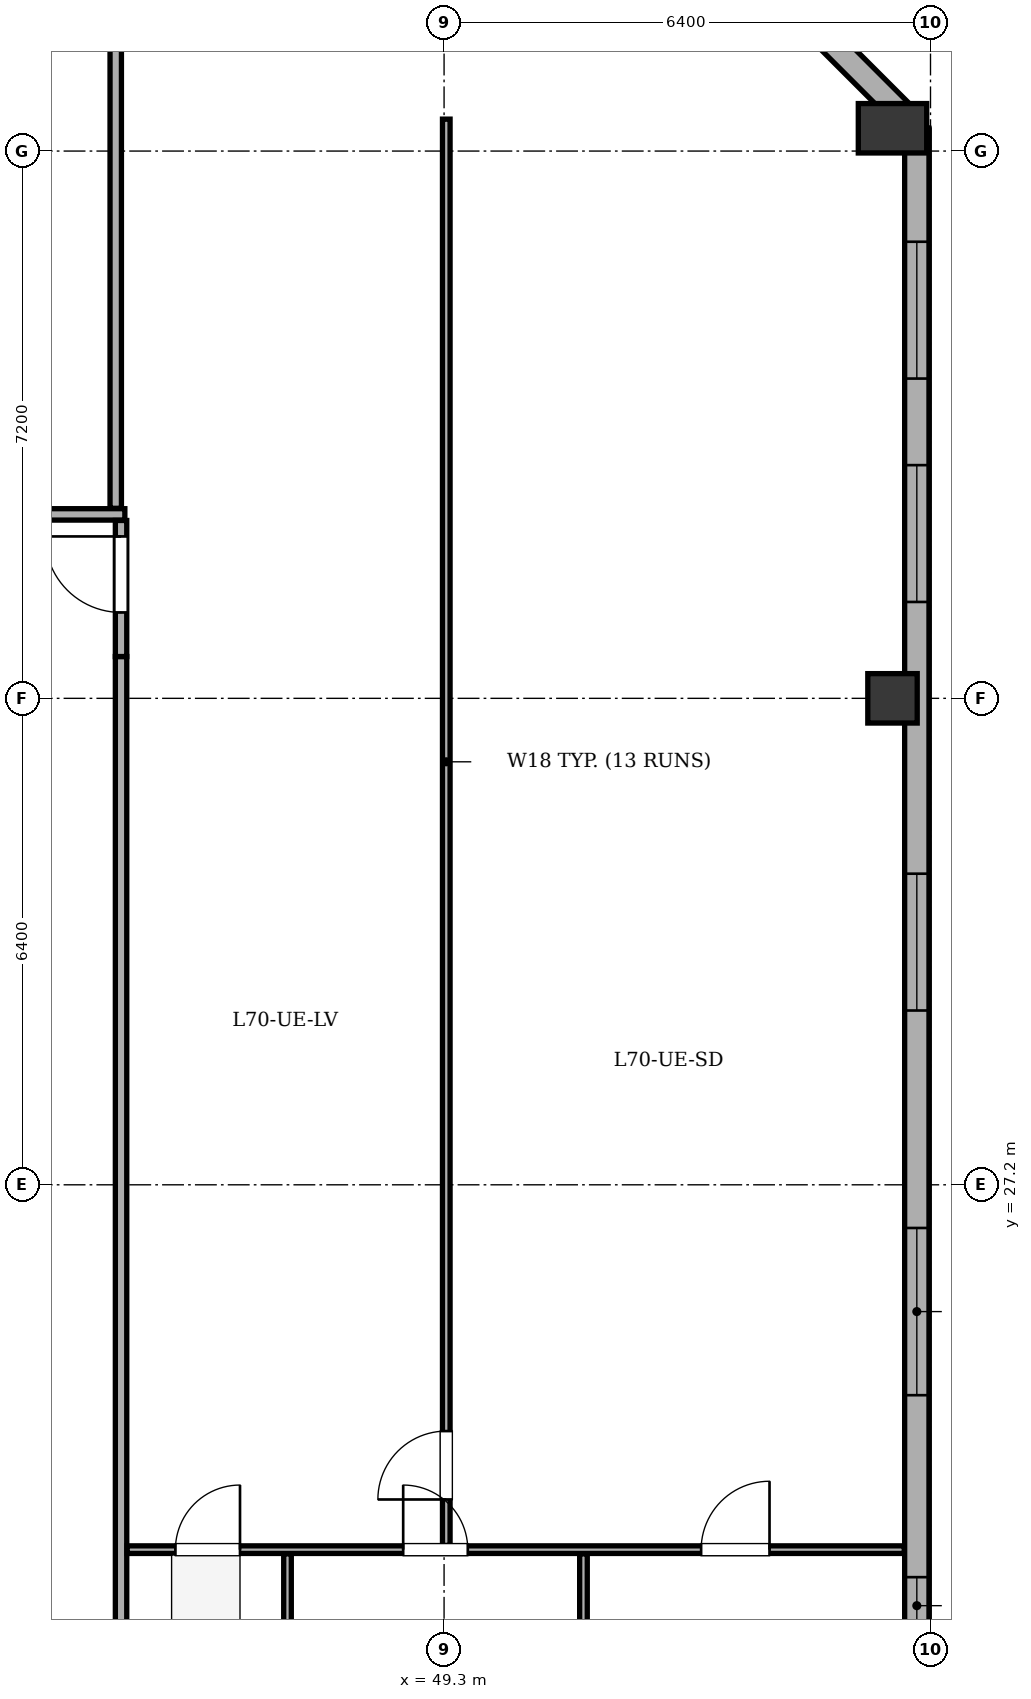
"""IFC4 building model, lengths in metres.
Left out: names, types, materials, properties, quantities, classifications, styles, units other than length and angle.
Written with IfcOpenShell. Run it as: python <this file> out.ifc"""

import sys

from ifc_helpers import new_model, si_unit, direction, frame, frame_2d, origin, origin_2d, place, context, subcontext, project, spatial, rectangle, extrude, element, fill, save


model = new_model("IFC4")
c1 = context("Model", 3, precision=1e-05, world=origin(), true_north=direction((0.0, 1.0)))
c2 = subcontext(c1, "Body", "Model", "MODEL_VIEW")
j1 = project(units=[si_unit("LENGTHUNIT", "METRE"), si_unit("PLANEANGLEUNIT", "RADIAN")], contexts=[c1])
p1 = place(None, origin())
s1 = spatial("IfcSite", under=j1, at=p1, CompositionType="ELEMENT")
p2 = place(p1, origin())
s2 = spatial("IfcBuilding", under=s1, at=p2, CompositionType="ELEMENT")
p3 = place(p2, frame((0.0, 0.0, 265.3)))
s3 = spatial("IfcBuildingStorey", under=s2, at=p3, CompositionType="ELEMENT", Elevation=265.3)
p4 = place(p3, frame((55.2, 33.6, 0.0), z_axis=(0.0, 0.0, 1.0), x_axis=(1.0, 0.0, 0.0)))
e1 = element("IfcColumn", 1, at=p4, inside=s3, PredefinedType="COLUMN", context=c2, shape_type="SweptSolid", body=[
    extrude(rectangle(XDim=0.65, YDim=0.65, at=origin_2d()), origin(), (0.0, 0.0, 1.0), 3.4),
])
p5 = place(p3, frame((55.2, 41.1, 0.0), z_axis=(0.0, 0.0, 1.0), x_axis=(1.0, 0.0, 0.0)))
e2 = element("IfcColumn", 2, at=p5, inside=s3, PredefinedType="COLUMN", context=c2, shape_type="SweptSolid", body=[
    extrude(rectangle(XDim=0.65, YDim=0.9, at=origin_2d()), origin(), (0.0, 0.0, 1.0), 3.4),
])
p6 = place(p3, frame((51.7, 44.92, 0.0), z_axis=(0.0, 0.0, 1.0), x_axis=(0.70712937715, -0.707084184501, 0.0)))
e3 = element("IfcWall", 3, at=p6, inside=s3, PredefinedType="STANDARD", context=c2, shape_type="SweptSolid", body=[
    extrude(rectangle(XDim=5.402, YDim=0.32, at=frame_2d((2.701, 0.0))), origin(), (0.0, 0.0, 1.0), 2.335),
])
p7 = place(p6, frame((2.001, 0.0, 0.75)))
e4 = element("IfcOpeningElement", 4, at=p7, cuts=e3, PredefinedType="OPENING", context=c2, shape_type="SweptSolid", body=[
    extrude(rectangle(XDim=1.4, YDim=1.465, at=frame_2d((0.7, 0.732))), frame((0.0, 0.17, 0.0), z_axis=(0.0, -1.0, 0.0), x_axis=(1.0, 0.0, 0.0)), (0.0, 0.0, 1.0), 0.34),
])
p8 = place(p3, frame((55.52, 41.1, 0.0), z_axis=(0.0, 0.0, 1.0), x_axis=(0.0, -1.0, 0.0)))
e5 = element("IfcWall", 5, at=p8, inside=s3, PredefinedType="STANDARD", context=c2, shape_type="SweptSolid", body=[
    extrude(rectangle(XDim=21.25, YDim=0.32, at=frame_2d((10.625, 0.0))), origin(), (0.0, 0.0, 1.0), 2.335),
])
p9 = place(p8, frame((1.493, 0.0, 0.75)))
e6 = element("IfcOpeningElement", 6, at=p9, cuts=e5, PredefinedType="OPENING", context=c2, shape_type="SweptSolid", body=[
    extrude(rectangle(XDim=1.8, YDim=1.465, at=frame_2d((0.9, 0.732))), frame((0.0, 0.17, 0.0), z_axis=(0.0, -1.0, 0.0), x_axis=(1.0, 0.0, 0.0)), (0.0, 0.0, 1.0), 0.34),
])
p10 = place(p8, frame((4.432, 0.0, 0.75)))
e7 = element("IfcOpeningElement", 7, at=p10, cuts=e5, PredefinedType="OPENING", context=c2, shape_type="SweptSolid", body=[
    extrude(rectangle(XDim=1.8, YDim=1.465, at=frame_2d((0.9, 0.732))), frame((0.0, 0.17, 0.0), z_axis=(0.0, -1.0, 0.0), x_axis=(1.0, 0.0, 0.0)), (0.0, 0.0, 1.0), 0.34),
])
p11 = place(p8, frame((9.807, 0.0, 0.75)))
e8 = element("IfcOpeningElement", 8, at=p11, cuts=e5, PredefinedType="OPENING", context=c2, shape_type="SweptSolid", body=[
    extrude(rectangle(XDim=1.8, YDim=1.465, at=frame_2d((0.9, 0.732))), frame((0.0, 0.17, 0.0), z_axis=(0.0, -1.0, 0.0), x_axis=(1.0, 0.0, 0.0)), (0.0, 0.0, 1.0), 0.34),
])
p12 = place(p8, frame((14.468, 0.0, 0.75)))
e9 = element("IfcOpeningElement", 9, at=p12, cuts=e5, PredefinedType="OPENING", context=c2, shape_type="SweptSolid", body=[
    extrude(rectangle(XDim=2.2, YDim=1.465, at=frame_2d((1.1, 0.732))), frame((0.0, 0.17, 0.0), z_axis=(0.0, -1.0, 0.0), x_axis=(1.0, 0.0, 0.0)), (0.0, 0.0, 1.0), 0.34),
])
p13 = place(p8, frame((19.062, 0.0, 0.75)))
e10 = element("IfcOpeningElement", 10, at=p13, cuts=e5, PredefinedType="OPENING", context=c2, shape_type="SweptSolid", body=[
    extrude(rectangle(XDim=0.75, YDim=1.45, at=frame_2d((0.375, 0.725))), frame((0.0, 0.17, 0.0), z_axis=(0.0, -1.0, 0.0), x_axis=(1.0, 0.0, 0.0)), (0.0, 0.0, 1.0), 0.34),
])
p14 = place(p3, frame((14.58, 36.02, 0.0), z_axis=(0.0, 0.0, 1.0), x_axis=(1.0, 0.0, 0.0)))
e11 = element("IfcWall", 11, at=p14, inside=s3, PredefinedType="PARTITIONING", context=c2, shape_type="SweptSolid", body=[
    extrude(rectangle(XDim=30.52, YDim=0.15, at=frame_2d((15.26, 0.0))), origin(), (0.0, 0.0, 1.0), 2.95),
])
p15 = place(p14, frame((3.253, 0.0, 0.0)))
e12 = element("IfcOpeningElement", 12, at=p15, cuts=e11, PredefinedType="OPENING", context=c2, shape_type="SweptSolid", body=[
    extrude(rectangle(XDim=1.0, YDim=2.1, at=frame_2d((0.5, 1.05))), frame((0.0, 0.085, 0.0), z_axis=(0.0, -1.0, 0.0), x_axis=(1.0, 0.0, 0.0)), (0.0, 0.0, 1.0), 0.17),
])
p16 = place(p14, frame((10.823, 0.0, 0.0)))
e13 = element("IfcOpeningElement", 13, at=p16, cuts=e11, PredefinedType="OPENING", context=c2, shape_type="SweptSolid", body=[
    extrude(rectangle(XDim=1.0, YDim=2.1, at=frame_2d((0.5, 1.05))), frame((0.0, 0.085, 0.0), z_axis=(0.0, -1.0, 0.0), x_axis=(1.0, 0.0, 0.0)), (0.0, 0.0, 1.0), 0.17),
])
p17 = place(p14, frame((18.697, 0.0, 0.0)))
e14 = element("IfcOpeningElement", 14, at=p17, cuts=e11, PredefinedType="OPENING", context=c2, shape_type="SweptSolid", body=[
    extrude(rectangle(XDim=1.0, YDim=2.1, at=frame_2d((0.5, 1.05))), frame((0.0, 0.085, 0.0), z_axis=(0.0, -1.0, 0.0), x_axis=(1.0, 0.0, 0.0)), (0.0, 0.0, 1.0), 0.17),
])
p18 = place(p14, frame((26.267, 0.0, 0.0)))
e15 = element("IfcOpeningElement", 15, at=p18, cuts=e11, PredefinedType="OPENING", context=c2, shape_type="SweptSolid", body=[
    extrude(rectangle(XDim=1.0, YDim=2.1, at=frame_2d((0.5, 1.05))), frame((0.0, 0.085, 0.0), z_axis=(0.0, -1.0, 0.0), x_axis=(1.0, 0.0, 0.0)), (0.0, 0.0, 1.0), 0.17),
])
p19 = place(p3, frame((44.98, 36.1, 0.0), z_axis=(0.0, 0.0, 1.0), x_axis=(0.0, 1.0, 0.0)))
e16 = element("IfcWall", 16, at=p19, inside=s3, PredefinedType="PARTITIONING", context=c2, shape_type="SweptSolid", body=[
    extrude(rectangle(XDim=8.655, YDim=0.15, at=frame_2d((4.327, 0.0))), origin(), (0.0, 0.0, 1.0), 2.95),
])
p20 = place(p3, frame((45.05, 20.25, 0.0), z_axis=(0.0, 0.0, 1.0), x_axis=(0.0, 1.0, 0.0)))
e17 = element("IfcWall", 17, at=p20, inside=s3, PredefinedType="PARTITIONING", context=c2, shape_type="SweptSolid", body=[
    extrude(rectangle(XDim=13.9, YDim=0.15, at=frame_2d((6.95, 0.0))), origin(), (0.0, 0.0, 1.0), 2.135),
])
p21 = place(p3, frame((45.05, 34.15, 0.0), z_axis=(0.0, 0.0, 1.0), x_axis=(0.0, 1.0, 0.0)))
e18 = element("IfcWall", 18, at=p21, inside=s3, PredefinedType="PARTITIONING", context=c2, shape_type="SweptSolid", body=[
    extrude(rectangle(XDim=1.79, YDim=0.15, at=frame_2d((0.895, 0.0))), origin(), (0.0, 0.0, 1.0), 2.135),
])
p22 = place(p21, frame((0.58, 0.0, 0.0)))
e19 = element("IfcOpeningElement", 19, at=p22, cuts=e18, PredefinedType="OPENING", context=c2, shape_type="SweptSolid", body=[
    extrude(rectangle(XDim=1.0, YDim=2.1, at=frame_2d((0.5, 1.05))), frame((0.0, 0.085, 0.0), z_axis=(0.0, -1.0, 0.0), x_axis=(1.0, 0.0, 0.0)), (0.0, 0.0, 1.0), 0.17),
])
p23 = place(p3, frame((45.13, 22.4, 0.0), z_axis=(0.0, 0.0, 1.0), x_axis=(1.0, 0.0, 0.0)))
e20 = element("IfcWall", 20, at=p23, inside=s3, PredefinedType="PARTITIONING", context=c2, shape_type="SweptSolid", body=[
    extrude(rectangle(XDim=10.225, YDim=0.1, at=frame_2d((5.113, 0.0))), origin(), (0.0, 0.0, 1.0), 2.95),
])
p24 = place(p23, frame((0.635, 0.0, 0.0)))
e21 = element("IfcOpeningElement", 21, at=p24, cuts=e20, PredefinedType="OPENING", context=c2, shape_type="SweptSolid", body=[
    extrude(rectangle(XDim=0.85, YDim=2.05, at=frame_2d((0.425, 1.025))), frame((0.0, 0.06, 0.0), z_axis=(0.0, -1.0, 0.0), x_axis=(1.0, 0.0, 0.0)), (0.0, 0.0, 1.0), 0.12),
])
p25 = place(p23, frame((3.632, 0.0, 0.0)))
e22 = element("IfcOpeningElement", 22, at=p25, cuts=e20, PredefinedType="OPENING", context=c2, shape_type="SweptSolid", body=[
    extrude(rectangle(XDim=0.85, YDim=2.05, at=frame_2d((0.425, 1.025))), frame((0.0, 0.06, 0.0), z_axis=(0.0, -1.0, 0.0), x_axis=(1.0, 0.0, 0.0)), (0.0, 0.0, 1.0), 0.12),
])
p26 = place(p23, frame((7.552, 0.0, 0.0)))
e23 = element("IfcOpeningElement", 23, at=p26, cuts=e20, PredefinedType="OPENING", context=c2, shape_type="SweptSolid", body=[
    extrude(rectangle(XDim=0.9, YDim=2.05, at=frame_2d((0.45, 1.025))), frame((0.0, 0.06, 0.0), z_axis=(0.0, -1.0, 0.0), x_axis=(1.0, 0.0, 0.0)), (0.0, 0.0, 1.0), 0.12),
])
p27 = place(p3, frame((49.329, 22.455, 0.0), z_axis=(0.0, 0.0, 1.0), x_axis=(0.0, 1.0, 0.0)))
e24 = element("IfcWall", 24, at=p27, inside=s3, PredefinedType="PARTITIONING", context=c2, shape_type="SweptSolid", body=[
    extrude(rectangle(XDim=18.765, YDim=0.1, at=frame_2d((9.382, 0.0))), origin(), (0.0, 0.0, 1.0), 2.95),
])
p28 = place(p27, frame((0.605, 0.0, 0.0)))
e25 = element("IfcOpeningElement", 25, at=p28, cuts=e24, PredefinedType="OPENING", context=c2, shape_type="SweptSolid", body=[
    extrude(rectangle(XDim=0.9, YDim=2.05, at=frame_2d((0.45, 1.025))), frame((0.0, 0.06, 0.0), z_axis=(0.0, -1.0, 0.0), x_axis=(1.0, 0.0, 0.0)), (0.0, 0.0, 1.0), 0.12),
])
for number, where, z_axis, x_axis in (
    (26, (47.24, 19.73, 0.0), (0.0, 0.0, 1.0), (0.0, 1.0, 0.0)),
    (27, (51.134, 19.73, 0.0), (0.0, 0.0, 1.0), (0.0, 1.0, 0.0)),
):
    element("IfcWall", number, at=place(p3, frame(where, z_axis=z_axis, x_axis=x_axis)), inside=s3, PredefinedType="PARTITIONING", context=c2, shape_type="SweptSolid", body=[
        extrude(rectangle(XDim=2.615, YDim=0.1, at=frame_2d((1.308, 0.0))), origin(), (0.0, 0.0, 1.0), 2.95),
    ])
p29 = place(p9, origin())
e28 = element("IfcWindow", 28, at=p29, inside=s3, PartitioningType="SINGLE_PANEL", PredefinedType="WINDOW", context=c2, shape_type="SweptSolid", body=[
    extrude(rectangle(XDim=1.8, YDim=1.465, at=frame_2d((0.9, 0.732))), frame((0.0, -0.01, 0.0), z_axis=(0.0, -1.0, 0.0), x_axis=(1.0, 0.0, 0.0)), (0.0, 0.0, 1.0), 0.06),
])
fill(e6, e28)
p30 = place(p10, origin())
e29 = element("IfcWindow", 29, at=p30, inside=s3, PartitioningType="SINGLE_PANEL", PredefinedType="WINDOW", context=c2, shape_type="SweptSolid", body=[
    extrude(rectangle(XDim=1.8, YDim=1.465, at=frame_2d((0.9, 0.732))), frame((0.0, -0.01, 0.0), z_axis=(0.0, -1.0, 0.0), x_axis=(1.0, 0.0, 0.0)), (0.0, 0.0, 1.0), 0.06),
])
fill(e7, e29)
p31 = place(p11, origin())
e30 = element("IfcWindow", 30, at=p31, inside=s3, PartitioningType="SINGLE_PANEL", PredefinedType="WINDOW", context=c2, shape_type="SweptSolid", body=[
    extrude(rectangle(XDim=1.8, YDim=1.465, at=frame_2d((0.9, 0.732))), frame((0.0, -0.01, 0.0), z_axis=(0.0, -1.0, 0.0), x_axis=(1.0, 0.0, 0.0)), (0.0, 0.0, 1.0), 0.06),
])
fill(e8, e30)
p32 = place(p12, origin())
e31 = element("IfcWindow", 31, at=p32, inside=s3, PartitioningType="SINGLE_PANEL", PredefinedType="WINDOW", context=c2, shape_type="SweptSolid", body=[
    extrude(rectangle(XDim=2.2, YDim=1.465, at=frame_2d((1.1, 0.732))), frame((0.0, -0.01, 0.0), z_axis=(0.0, -1.0, 0.0), x_axis=(1.0, 0.0, 0.0)), (0.0, 0.0, 1.0), 0.06),
])
fill(e9, e31)
p33 = place(p13, origin())
e32 = element("IfcWindow", 32, at=p33, inside=s3, PartitioningType="SINGLE_PANEL", PredefinedType="WINDOW", context=c2, shape_type="SweptSolid", body=[
    extrude(rectangle(XDim=0.75, YDim=1.45, at=frame_2d((0.375, 0.725))), frame((0.0, -0.01, 0.0), z_axis=(0.0, -1.0, 0.0), x_axis=(1.0, 0.0, 0.0)), (0.0, 0.0, 1.0), 0.06),
])
fill(e10, e32)
p34 = place(p22, origin())
e33 = element("IfcDoor", 33, at=p34, inside=s3, OperationType="SINGLE_SWING_RIGHT", PredefinedType="DOOR", context=c2, shape_type="SweptSolid", body=[
    extrude(rectangle(XDim=1.0, YDim=2.1, at=frame_2d((0.5, 1.05))), frame((0.0, 0.025, 0.0), z_axis=(0.0, -1.0, 0.0), x_axis=(1.0, 0.0, 0.0)), (0.0, 0.0, 1.0), 0.05),
])
fill(e19, e33)
p35 = place(p28, origin())
e34 = element("IfcDoor", 34, at=p35, inside=s3, OperationType="SINGLE_SWING_LEFT", PredefinedType="DOOR", context=c2, shape_type="SweptSolid", body=[
    extrude(rectangle(XDim=0.9, YDim=2.05, at=frame_2d((0.45, 1.025))), frame((0.0, 0.025, 0.0), z_axis=(0.0, -1.0, 0.0), x_axis=(1.0, 0.0, 0.0)), (0.0, 0.0, 1.0), 0.05),
])
fill(e25, e34)
p36 = place(p24, origin())
e35 = element("IfcDoor", 35, at=p36, inside=s3, OperationType="SINGLE_SWING_RIGHT", PredefinedType="DOOR", context=c2, shape_type="SweptSolid", body=[
    extrude(rectangle(XDim=0.85, YDim=2.05, at=frame_2d((0.425, 1.025))), frame((0.0, 0.025, 0.0), z_axis=(0.0, -1.0, 0.0), x_axis=(1.0, 0.0, 0.0)), (0.0, 0.0, 1.0), 0.05),
])
fill(e21, e35)
p37 = place(p25, origin())
e36 = element("IfcDoor", 36, at=p37, inside=s3, OperationType="SINGLE_SWING_LEFT", PredefinedType="DOOR", context=c2, shape_type="SweptSolid", body=[
    extrude(rectangle(XDim=0.85, YDim=2.05, at=frame_2d((0.425, 1.025))), frame((0.0, 0.025, 0.0), z_axis=(0.0, -1.0, 0.0), x_axis=(1.0, 0.0, 0.0)), (0.0, 0.0, 1.0), 0.05),
])
fill(e22, e36)
p38 = place(p26, origin())
e37 = element("IfcDoor", 37, at=p38, inside=s3, OperationType="SINGLE_SWING_RIGHT", PredefinedType="DOOR", context=c2, shape_type="SweptSolid", body=[
    extrude(rectangle(XDim=0.9, YDim=2.05, at=frame_2d((0.45, 1.025))), frame((0.0, 0.025, 0.0), z_axis=(0.0, -1.0, 0.0), x_axis=(1.0, 0.0, 0.0)), (0.0, 0.0, 1.0), 0.05),
])
fill(e23, e37)
save(model, sys.argv[1])
